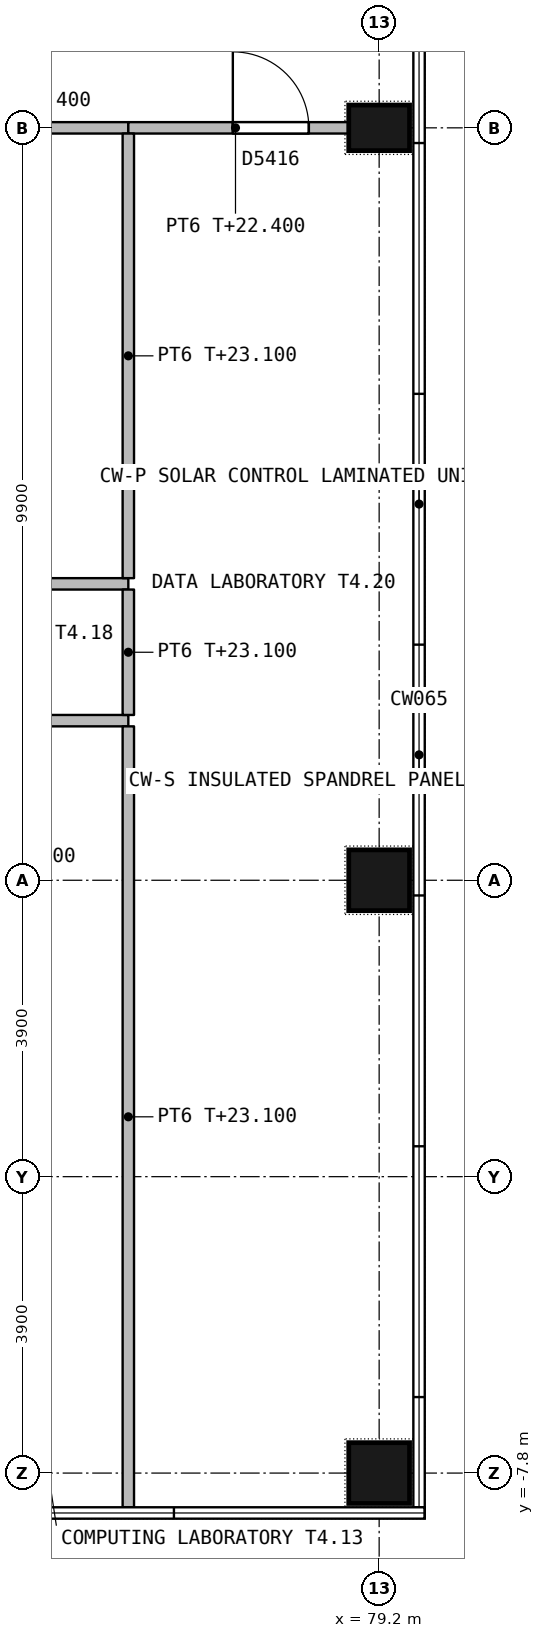
"""IFC4 building model, lengths in metres.
Left out: names, types, materials, properties, quantities, classifications, styles, units other than length and angle.
Written with IfcOpenShell. Run it as: python <this file> out.ifc"""

import sys

from ifc_helpers import new_model, si_unit, direction, frame, frame_2d, origin, origin_2d, place, context, subcontext, project, spatial, rectangle, extrude, element, fill, save


model = new_model("IFC4")
c1 = context("Model", 3, precision=1e-05, world=origin(), true_north=direction((0.0, 1.0)))
c2 = subcontext(c1, "Body", "Model", "MODEL_VIEW")
j1 = project(units=[si_unit("LENGTHUNIT", "METRE"), si_unit("PLANEANGLEUNIT", "RADIAN")], contexts=[c1])
p1 = place(None, origin())
s1 = spatial("IfcSite", under=j1, at=p1, CompositionType="ELEMENT")
p2 = place(p1, origin())
s2 = spatial("IfcBuilding", under=s1, at=p2, CompositionType="ELEMENT")
p3 = place(p2, frame((0.0, 0.0, 18.9)))
s3 = spatial("IfcBuildingStorey", under=s2, at=p3, CompositionType="ELEMENT", Elevation=18.9)
for number, where, z_axis, x_axis in (
    (1, (79.2, -7.8, 0.0), (0.0, 0.0, 1.0), (1.0, 0.0, 0.0)),
    (2, (79.2, 0.0, 0.0), (0.0, 0.0, 1.0), (1.0, 0.0, 0.0)),
):
    element("IfcColumn", number, at=place(p3, frame(where, z_axis=z_axis, x_axis=x_axis)), inside=s3, PredefinedType="COLUMN", context=c2, shape_type="SweptSolid", body=[
        extrude(rectangle(XDim=0.8, YDim=0.8, at=origin_2d()), origin(), (0.0, 0.0, 1.0), 4.5),
    ])
p4 = place(p3, frame((79.2, 9.9, 0.0), z_axis=(0.0, 0.0, 1.0), x_axis=(1.0, 0.0, 0.0)))
e3 = element("IfcColumn", 3, at=p4, inside=s3, PredefinedType="COLUMN", context=c2, shape_type="SweptSolid", body=[
    extrude(rectangle(XDim=0.8, YDim=0.6, at=origin_2d()), origin(), (0.0, 0.0, 1.0), 4.5),
])
p5 = place(p3, frame((73.0, 9.9, 0.0), z_axis=(0.0, 0.0, 1.0), x_axis=(1.0, 0.0, 0.0)))
e4 = element("IfcWall", 4, at=p5, inside=s3, PredefinedType="PARTITIONING", context=c2, shape_type="SweptSolid", body=[
    extrude(rectangle(XDim=2.9, YDim=0.15, at=frame_2d((1.45, 0.0))), origin(), (0.0, 0.0, 1.0), 3.5),
])
p6 = place(p3, frame((75.9, 9.9, 0.0), z_axis=(0.0, 0.0, 1.0), x_axis=(1.0, 0.0, 0.0)))
e5 = element("IfcWall", 5, at=p6, inside=s3, PredefinedType="PARTITIONING", context=c2, shape_type="SweptSolid", body=[
    extrude(rectangle(XDim=2.9, YDim=0.15, at=frame_2d((1.45, 0.0))), origin(), (0.0, 0.0, 1.0), 3.5),
])
p7 = place(p6, frame((1.375, 0.0, 0.0)))
e6 = element("IfcOpeningElement", 6, at=p7, cuts=e5, PredefinedType="OPENING", context=c2, shape_type="SweptSolid", body=[
    extrude(rectangle(XDim=1.0, YDim=2.1, at=frame_2d((0.5, 1.05))), frame((0.0, 0.085, 0.0), z_axis=(0.0, -1.0, 0.0), x_axis=(1.0, 0.0, 0.0)), (0.0, 0.0, 1.0), 0.17),
])
p8 = place(p3, frame((75.9, 2.1, 0.0), z_axis=(0.0, 0.0, 1.0), x_axis=(-1.0, 0.0, 0.0)))
e7 = element("IfcWall", 7, at=p8, inside=s3, PredefinedType="PARTITIONING", context=c2, shape_type="SweptSolid", body=[
    extrude(rectangle(XDim=3.225, YDim=0.15, at=frame_2d((1.612, 0.0))), origin(), (0.0, 0.0, 1.0), 4.2),
])
p9 = place(p8, frame((1.15, 0.0, 0.0)))
e8 = element("IfcOpeningElement", 8, at=p9, cuts=e7, PredefinedType="OPENING", context=c2, shape_type="SweptSolid", body=[
    extrude(rectangle(XDim=1.0, YDim=2.1, at=frame_2d((0.5, 1.05))), frame((0.0, 0.085, 0.0), z_axis=(0.0, -1.0, 0.0), x_axis=(1.0, 0.0, 0.0)), (0.0, 0.0, 1.0), 0.17),
])
p10 = place(p3, frame((75.9, -8.25, 0.0), z_axis=(0.0, 0.0, 1.0), x_axis=(0.0, 1.0, 0.0)))
e9 = element("IfcWall", 9, at=p10, inside=s3, PredefinedType="PARTITIONING", context=c2, shape_type="SweptSolid", body=[
    extrude(rectangle(XDim=10.275, YDim=0.15, at=frame_2d((5.137, 0.0))), origin(), (0.0, 0.0, 1.0), 4.2),
])
p11 = place(p3, frame((75.9, 3.9, 0.0), z_axis=(0.0, 0.0, 1.0), x_axis=(-1.0, 0.0, 0.0)))
e10 = element("IfcWall", 10, at=p11, inside=s3, PredefinedType="PARTITIONING", context=c2, shape_type="SweptSolid", body=[
    extrude(rectangle(XDim=6.6, YDim=0.15, at=frame_2d((3.3, 0.0))), origin(), (0.0, 0.0, 1.0), 4.2),
])
p12 = place(p3, frame((75.9, 2.175, 0.0), z_axis=(0.0, 0.0, 1.0), x_axis=(0.0, 1.0, 0.0)))
e11 = element("IfcWall", 11, at=p12, inside=s3, PredefinedType="PARTITIONING", context=c2, shape_type="SweptSolid", body=[
    extrude(rectangle(XDim=1.65, YDim=0.15, at=frame_2d((0.825, 0.0))), origin(), (0.0, 0.0, 1.0), 4.2),
])
p13 = place(p3, frame((75.9, 3.975, 0.0), z_axis=(0.0, 0.0, 1.0), x_axis=(0.0, 1.0, 0.0)))
e12 = element("IfcWall", 12, at=p13, inside=s3, PredefinedType="PARTITIONING", context=c2, shape_type="SweptSolid", body=[
    extrude(rectangle(XDim=5.85, YDim=0.15, at=frame_2d((2.925, 0.0))), origin(), (0.0, 0.0, 1.0), 4.2),
])
p14 = place(p7, origin())
e13 = element("IfcDoor", 13, at=p14, inside=s3, OperationType="SINGLE_SWING_LEFT", PredefinedType="DOOR", context=c2, shape_type="SweptSolid", body=[
    extrude(rectangle(XDim=1.0, YDim=2.1, at=frame_2d((0.5, 1.05))), frame((0.0, 0.027, 0.0), z_axis=(0.0, -1.0, 0.0), x_axis=(1.0, 0.0, 0.0)), (0.0, 0.0, 1.0), 0.054),
])
fill(e6, e13)
save(model, sys.argv[1])
